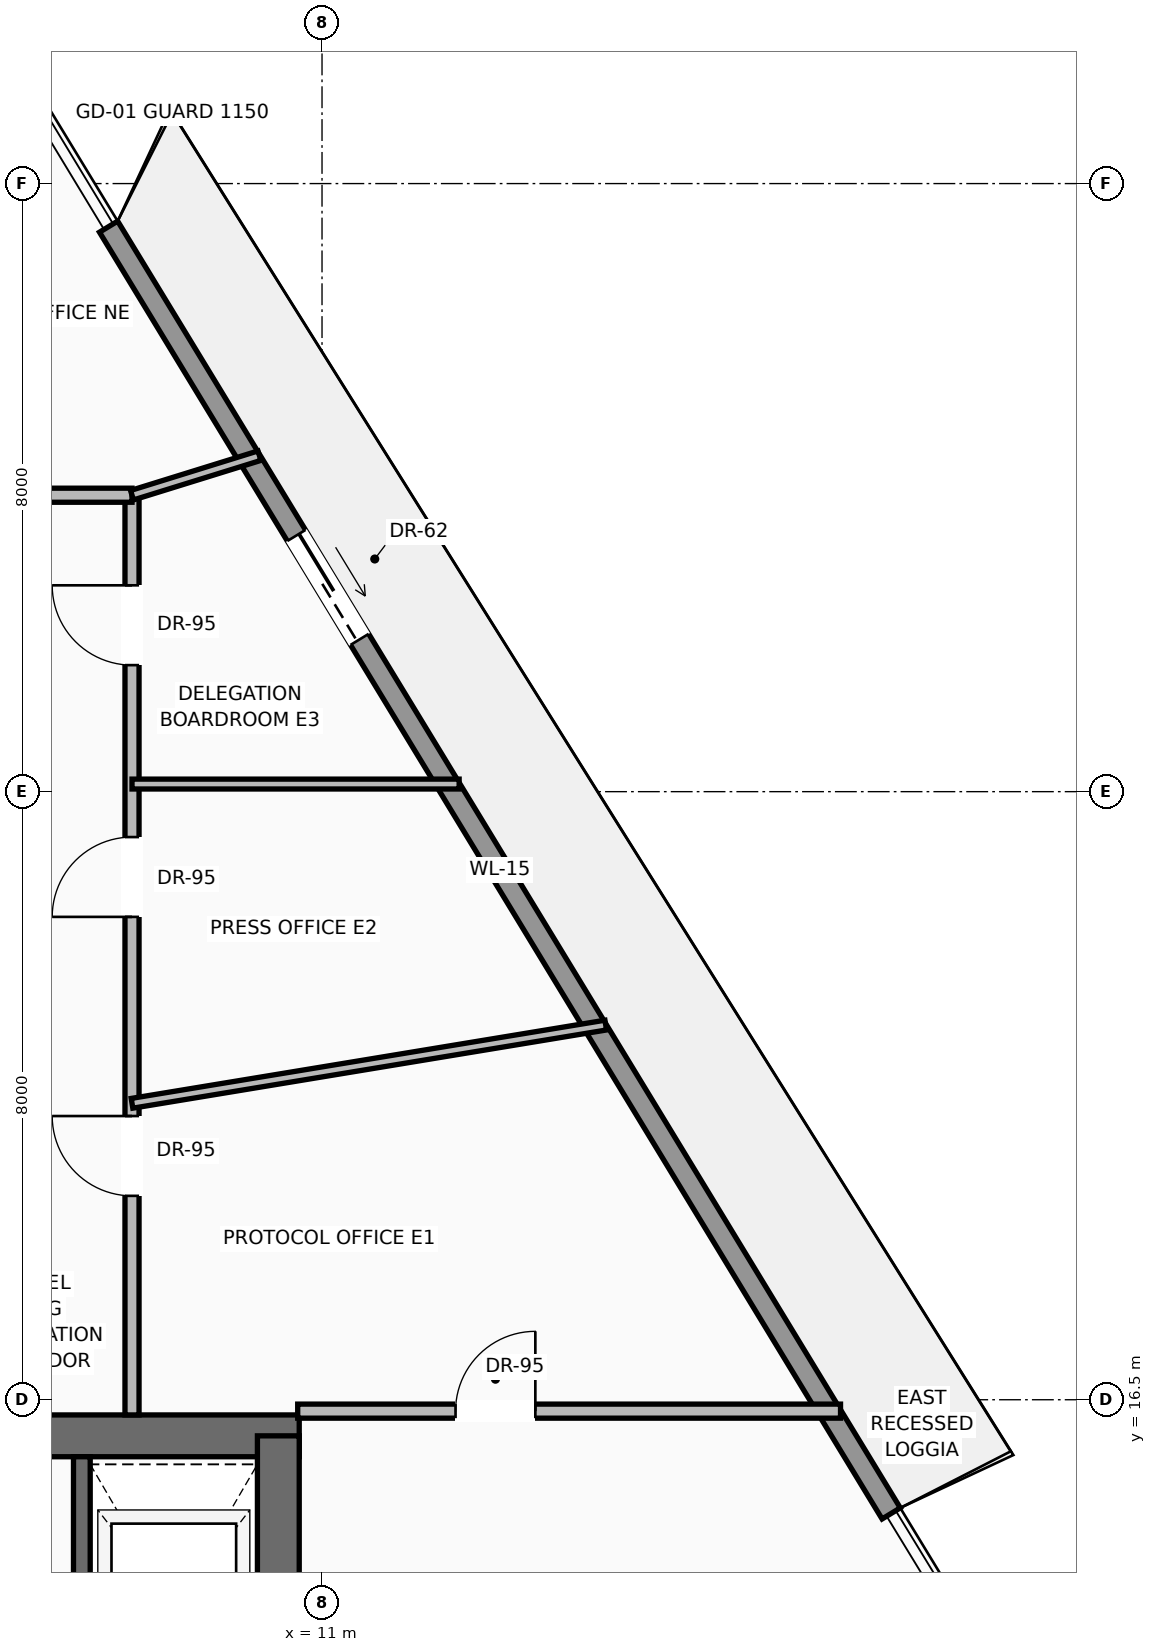
"""IFC4 building model, lengths in metres.
Left out: names, types, materials, properties, quantities, classifications, styles, units other than length and angle.
Written with IfcOpenShell. Run it as: python <this file> out.ifc"""

import sys

from ifc_helpers import new_model, si_unit, direction, frame, frame_2d, origin, place, context, subcontext, project, spatial, rectangle, extrude, source, transform, mapped, element, fill, save


model = new_model("IFC4")
c1 = context("Model", 3, precision=1e-05, world=origin(), true_north=direction((0.0, 1.0)))
c2 = subcontext(c1, "Body", "Model", "MODEL_VIEW")
j1 = project(units=[si_unit("LENGTHUNIT", "METRE"), si_unit("PLANEANGLEUNIT", "RADIAN")], contexts=[c1])
p1 = place(None, origin())
s1 = spatial("IfcSite", under=j1, at=p1, CompositionType="ELEMENT")
p2 = place(p1, origin())
s2 = spatial("IfcBuilding", under=s1, at=p2, CompositionType="ELEMENT")
p3 = place(p2, frame((0.0, 0.0, 254.5)))
s3 = spatial("IfcBuildingStorey", under=s2, at=p3, CompositionType="ELEMENT", Elevation=254.5)
p4 = place(p3, frame((-10.7, 16.025, 0.0), z_axis=(0.0, 0.0, 1.0), x_axis=(1.0, 0.0, 0.0)))
e1 = element("IfcWall", 1, at=p4, inside=s3, PredefinedType="SHEAR", context=c2, shape_type="SweptSolid", body=[
    extrude(rectangle(XDim=21.4, YDim=0.55, at=frame_2d((10.7, 0.0))), origin(), (0.0, 0.0, 1.0), 3.15),
])
p5 = place(p4, frame((3.27, 0.0, 0.0)))
e2 = element("IfcOpeningElement", 2, at=p5, cuts=e1, PredefinedType="OPENING", context=c2, shape_type="SweptSolid", body=[
    extrude(rectangle(XDim=1.3, YDim=2.3, at=frame_2d((0.65, 1.15))), frame((0.0, 0.285, 0.0), z_axis=(0.0, -1.0, 0.0), x_axis=(1.0, 0.0, 0.0)), (0.0, 0.0, 1.0), 0.57),
])
p6 = place(p4, frame((9.7, 0.0, 0.0)))
e3 = element("IfcOpeningElement", 3, at=p6, cuts=e1, PredefinedType="OPENING", context=c2, shape_type="SweptSolid", body=[
    extrude(rectangle(XDim=2.0, YDim=2.4, at=frame_2d((1.0, 1.2))), frame((0.0, 0.285, 0.0), z_axis=(0.0, -1.0, 0.0), x_axis=(1.0, 0.0, 0.0)), (0.0, 0.0, 1.0), 0.57),
])
p7 = place(p3, frame((10.425, 0.575, 0.0), z_axis=(0.0, 0.0, 1.0), x_axis=(0.0, 1.0, 0.0)))
e4 = element("IfcWall", 4, at=p7, inside=s3, PredefinedType="SHEAR", context=c2, shape_type="SweptSolid", body=[
    extrude(rectangle(XDim=15.45, YDim=0.55, at=frame_2d((7.725, 0.0))), origin(), (0.0, 0.0, 1.0), 3.15),
])
p8 = place(p3, frame((8.192, 31.933, 0.0), z_axis=(0.0, 0.0, 1.0), x_axis=(0.51964514921, -0.854382185502, 0.0)))
e5 = element("IfcWall", 5, at=p8, inside=s3, PredefinedType="SOLIDWALL", context=c2, shape_type="SweptSolid", body=[
    extrude(rectangle(XDim=19.814, YDim=0.28, at=frame_2d((9.907, 0.0))), origin(), (0.0, 0.0, 1.0), 2.73),
])
p9 = place(p8, frame((4.755, 0.0, 0.0)))
e6 = element("IfcOpeningElement", 6, at=p9, cuts=e5, PredefinedType="OPENING", context=c2, shape_type="SweptSolid", body=[
    extrude(rectangle(XDim=1.6, YDim=2.35, at=frame_2d((0.8, 1.175))), frame((0.0, 0.15, 0.0), z_axis=(0.0, -1.0, 0.0), x_axis=(1.0, 0.0, 0.0)), (0.0, 0.0, 1.0), 0.3),
])
p10 = place(p3, frame((7.84, 11.87, 0.0), z_axis=(0.0, 0.0, 1.0), x_axis=(0.0, 1.0, 0.0)))
e7 = element("IfcWall", 7, at=p10, inside=s3, PredefinedType="SOLIDWALL", context=c2, shape_type="SweptSolid", body=[
    extrude(rectangle(XDim=3.88, YDim=0.22, at=frame_2d((1.94, 0.0))), origin(), (0.0, 0.0, 1.0), 3.15),
])
p11 = place(p3, frame((8.5, 16.3, 0.0), z_axis=(0.0, 0.0, 1.0), x_axis=(0.0, 1.0, 0.0)))
e8 = element("IfcWall", 8, at=p11, inside=s3, PredefinedType="PARTITIONING", context=c2, shape_type="SweptSolid", body=[
    extrude(rectangle(XDim=12.1, YDim=0.185, at=frame_2d((6.05, 0.0))), origin(), (0.0, 0.0, 1.0), 3.142),
])
p12 = place(p11, frame((2.882, 0.0, 0.0)))
e9 = element("IfcOpeningElement", 9, at=p12, cuts=e8, PredefinedType="OPENING", context=c2, shape_type="SweptSolid", body=[
    extrude(rectangle(XDim=1.05, YDim=2.25, at=frame_2d((0.525, 1.125))), frame((0.0, 0.103, 0.0), z_axis=(0.0, -1.0, 0.0), x_axis=(1.0, 0.0, 0.0)), (0.0, 0.0, 1.0), 0.205),
])
p13 = place(p11, frame((6.552, 0.0, 0.0)))
e10 = element("IfcOpeningElement", 10, at=p13, cuts=e8, PredefinedType="OPENING", context=c2, shape_type="SweptSolid", body=[
    extrude(rectangle(XDim=1.05, YDim=2.25, at=frame_2d((0.525, 1.125))), frame((0.0, 0.103, 0.0), z_axis=(0.0, -1.0, 0.0), x_axis=(1.0, 0.0, 0.0)), (0.0, 0.0, 1.0), 0.205),
])
p14 = place(p11, frame((9.865, 0.0, 0.0)))
e11 = element("IfcOpeningElement", 11, at=p14, cuts=e8, PredefinedType="OPENING", context=c2, shape_type="SweptSolid", body=[
    extrude(rectangle(XDim=1.05, YDim=2.25, at=frame_2d((0.525, 1.125))), frame((0.0, 0.103, 0.0), z_axis=(0.0, -1.0, 0.0), x_axis=(1.0, 0.0, 0.0)), (0.0, 0.0, 1.0), 0.205),
])
p15 = place(p3, frame((-8.3, 28.4, 0.0), z_axis=(0.0, 0.0, 1.0), x_axis=(1.0, 0.0, 0.0)))
e12 = element("IfcWall", 12, at=p15, inside=s3, PredefinedType="PARTITIONING", context=c2, shape_type="SweptSolid", body=[
    extrude(rectangle(XDim=16.8, YDim=0.185, at=frame_2d((8.4, 0.0))), origin(), (0.0, 0.0, 1.0), 3.142),
])
p16 = place(p15, frame((3.498, 0.0, 0.0)))
e13 = element("IfcOpeningElement", 13, at=p16, cuts=e12, PredefinedType="OPENING", context=c2, shape_type="SweptSolid", body=[
    extrude(rectangle(XDim=1.05, YDim=2.25, at=frame_2d((0.525, 1.125))), frame((0.0, 0.103, 0.0), z_axis=(0.0, -1.0, 0.0), x_axis=(1.0, 0.0, 0.0)), (0.0, 0.0, 1.0), 0.205),
])
p17 = place(p15, frame((8.998, 0.0, 0.0)))
e14 = element("IfcOpeningElement", 14, at=p17, cuts=e12, PredefinedType="OPENING", context=c2, shape_type="SweptSolid", body=[
    extrude(rectangle(XDim=1.05, YDim=2.25, at=frame_2d((0.525, 1.125))), frame((0.0, 0.103, 0.0), z_axis=(0.0, -1.0, 0.0), x_axis=(1.0, 0.0, 0.0)), (0.0, 0.0, 1.0), 0.205),
])
p18 = place(p15, frame((12.052, 0.0, 0.0)))
e15 = element("IfcOpeningElement", 15, at=p18, cuts=e12, PredefinedType="OPENING", context=c2, shape_type="SweptSolid", body=[
    extrude(rectangle(XDim=1.05, YDim=2.25, at=frame_2d((0.525, 1.125))), frame((0.0, 0.103, 0.0), z_axis=(0.0, -1.0, 0.0), x_axis=(1.0, 0.0, 0.0)), (0.0, 0.0, 1.0), 0.205),
])
p19 = place(p15, frame((14.498, 0.0, 0.0)))
e16 = element("IfcOpeningElement", 16, at=p19, cuts=e12, PredefinedType="OPENING", context=c2, shape_type="SweptSolid", body=[
    extrude(rectangle(XDim=1.05, YDim=2.25, at=frame_2d((0.525, 1.125))), frame((0.0, 0.103, 0.0), z_axis=(0.0, -1.0, 0.0), x_axis=(1.0, 0.0, 0.0)), (0.0, 0.0, 1.0), 0.205),
])
p20 = place(p15, frame((1.052, 0.0, 0.0)))
e17 = element("IfcOpeningElement", 17, at=p20, cuts=e12, PredefinedType="OPENING", context=c2, shape_type="SweptSolid", body=[
    extrude(rectangle(XDim=1.05, YDim=2.25, at=frame_2d((0.525, 1.125))), frame((0.0, 0.103, 0.0), z_axis=(0.0, -1.0, 0.0), x_axis=(1.0, 0.0, 0.0)), (0.0, 0.0, 1.0), 0.205),
])
p21 = place(p3, frame((10.68, 16.35, 0.0), z_axis=(0.0, 0.0, 1.0), x_axis=(1.0, 0.0, 0.0)))
e18 = element("IfcWall", 18, at=p21, inside=s3, PredefinedType="PARTITIONING", context=c2, shape_type="SweptSolid", body=[
    extrude(rectangle(XDim=7.142, YDim=0.185, at=frame_2d((3.571, 0.0))), origin(), (0.0, 0.0, 1.0), 3.142),
])
p22 = place(p21, frame((2.077, 0.0, 0.0)))
e19 = element("IfcOpeningElement", 19, at=p22, cuts=e18, PredefinedType="OPENING", context=c2, shape_type="SweptSolid", body=[
    extrude(rectangle(XDim=1.05, YDim=2.25, at=frame_2d((0.525, 1.125))), frame((0.0, 0.103, 0.0), z_axis=(0.0, -1.0, 0.0), x_axis=(1.0, 0.0, 0.0)), (0.0, 0.0, 1.0), 0.205),
])
p23 = place(p3, frame((8.5, 28.4, 0.0), z_axis=(0.0, 0.0, 1.0), x_axis=(0.955069567147, 0.296381716556, 0.0)))
e20 = element("IfcWall", 20, at=p23, inside=s3, PredefinedType="PARTITIONING", context=c2, shape_type="SweptSolid", body=[
    extrude(rectangle(XDim=1.755, YDim=0.13, at=frame_2d((0.878, 0.0))), origin(), (0.0, 0.0, 1.0), 3.142),
])
p24 = place(p3, frame((8.5, 20.4, 0.0), z_axis=(0.0, 0.0, 1.0), x_axis=(0.986649667214, 0.16285709744, 0.0)))
e21 = element("IfcWall", 21, at=p24, inside=s3, PredefinedType="PARTITIONING", context=c2, shape_type="SweptSolid", body=[
    extrude(rectangle(XDim=6.317, YDim=0.13, at=frame_2d((3.159, 0.0))), origin(), (0.0, 0.0, 1.0), 3.142),
])
p25 = place(p3, frame((8.5, 24.6, 0.0), z_axis=(0.0, 0.0, 1.0), x_axis=(1.0, 0.0, 0.0)))
e22 = element("IfcWall", 22, at=p25, inside=s3, PredefinedType="PARTITIONING", context=c2, shape_type="SweptSolid", body=[
    extrude(rectangle(XDim=4.304, YDim=0.13, at=frame_2d((2.152, 0.0))), origin(), (0.0, 0.0, 1.0), 2.593),
])
m1 = source(origin(), c2, "Body", "SweptSolid", [
    extrude(rectangle(XDim=1.6, YDim=2.35, at=frame_2d((0.8, 1.175))), frame((0.0, 0.025, 0.0), z_axis=(0.0, -1.0, 0.0), x_axis=(1.0, 0.0, 0.0)), (0.0, 0.0, 1.0), 0.05),
])
p26 = place(p9, origin())
e23 = element("IfcDoor", 23, at=p26, inside=s3, OperationType="SLIDING_TO_RIGHT", PredefinedType="DOOR", context=c2, shape_type="MappedRepresentation", body=[
    mapped(m1, transform((0.0, 0.0, 0.0), scale=1.0)),
])
fill(e6, e23)
m2 = source(origin(), c2, "Body", "SweptSolid", [
    extrude(rectangle(XDim=1.05, YDim=2.25, at=frame_2d((0.525, 1.125))), frame((0.0, 0.025, 0.0), z_axis=(0.0, -1.0, 0.0), x_axis=(1.0, 0.0, 0.0)), (0.0, 0.0, 1.0), 0.05),
])
p27 = place(p22, origin())
e24 = element("IfcDoor", 24, at=p27, inside=s3, OperationType="SINGLE_SWING_RIGHT", PredefinedType="DOOR", context=c2, shape_type="MappedRepresentation", body=[
    mapped(m2, transform((0.0, 0.0, 0.0), scale=1.0)),
])
fill(e19, e24)
p28 = place(p12, origin())
e25 = element("IfcDoor", 25, at=p28, inside=s3, OperationType="SINGLE_SWING_RIGHT", PredefinedType="DOOR", context=c2, shape_type="MappedRepresentation", body=[
    mapped(m2, transform((0.0, 0.0, 0.0), scale=1.0)),
])
fill(e9, e25)
p29 = place(p13, origin())
e26 = element("IfcDoor", 26, at=p29, inside=s3, OperationType="SINGLE_SWING_LEFT", PredefinedType="DOOR", context=c2, shape_type="MappedRepresentation", body=[
    mapped(m2, transform((0.0, 0.0, 0.0), scale=1.0)),
])
fill(e10, e26)
p30 = place(p14, origin())
e27 = element("IfcDoor", 27, at=p30, inside=s3, OperationType="SINGLE_SWING_RIGHT", PredefinedType="DOOR", context=c2, shape_type="MappedRepresentation", body=[
    mapped(m2, transform((0.0, 0.0, 0.0), scale=1.0)),
])
fill(e11, e27)
save(model, sys.argv[1])
